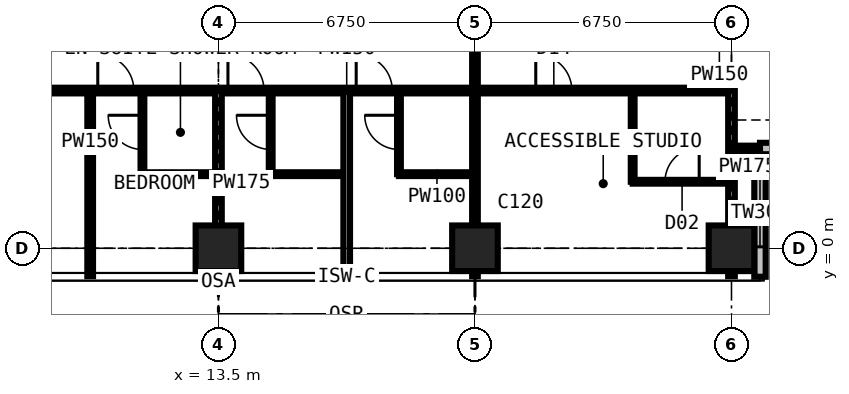
"""IFC4 building model, lengths in metres.
Left out: names, types, materials, properties, quantities, classifications, styles, units other than length and angle.
Written with IfcOpenShell. Run it as: python <this file> out.ifc"""

import sys

from ifc_helpers import new_model, si_unit, direction, frame, frame_2d, origin, origin_2d, place, context, subcontext, project, spatial, rectangle, extrude, element, fill, save


model = new_model("IFC4")
c1 = context("Model", 3, precision=1e-05, world=origin(), true_north=direction((0.0, 1.0)))
c2 = subcontext(c1, "Body", "Model", "MODEL_VIEW")
j1 = project(units=[si_unit("LENGTHUNIT", "METRE"), si_unit("PLANEANGLEUNIT", "RADIAN")], contexts=[c1])
p1 = place(None, origin())
s1 = spatial("IfcSite", under=j1, at=p1, CompositionType="ELEMENT")
p2 = place(p1, origin())
s2 = spatial("IfcBuilding", under=s1, at=p2, CompositionType="ELEMENT")
p3 = place(p2, frame((0.0, 0.0, 174.6)))
s3 = spatial("IfcBuildingStorey", under=s2, at=p3, CompositionType="ELEMENT", Elevation=174.6)
for number, where, z_axis, x_axis in (
    (1, (13.5, 0.0, 0.0), (0.0, 0.0, 1.0), (1.0, 0.0, 0.0)),
    (2, (20.25, 0.0, 0.0), (0.0, 0.0, 1.0), (1.0, 0.0, 0.0)),
    (3, (27.0, 0.0, 0.0), (0.0, 0.0, 1.0), (1.0, 0.0, 0.0)),
):
    element("IfcColumn", number, at=place(p3, frame(where, z_axis=z_axis, x_axis=x_axis)), inside=s3, PredefinedType="COLUMN", context=c2, shape_type="SweptSolid", body=[
        extrude(rectangle(XDim=1.2, YDim=1.2, at=origin_2d()), origin(), (0.0, 0.0, 1.0), 3.6),
    ])
p4 = place(p3, frame((27.75, -0.75, 0.0), z_axis=(0.0, 0.0, 1.0), x_axis=(0.0, 1.0, 0.0)))
e4 = element("IfcWall", 4, at=p4, inside=s3, PredefinedType="SOLIDWALL", context=c2, shape_type="SweptSolid", body=[
    extrude(rectangle(XDim=3.375, YDim=0.3, at=frame_2d((1.688, 0.0))), origin(), (0.0, 0.0, 1.0), 3.375),
])
p5 = place(p4, frame((0.788, 0.0, 0.6)))
e5 = element("IfcOpeningElement", 5, at=p5, cuts=e4, PredefinedType="OPENING", context=c2, shape_type="SweptSolid", body=[
    extrude(rectangle(XDim=1.8, YDim=2.1, at=frame_2d((0.9, 1.05))), frame((0.0, 0.16, 0.0), z_axis=(0.0, -1.0, 0.0), x_axis=(1.0, 0.0, 0.0)), (0.0, 0.0, 1.0), 0.32),
])
p6 = place(p3, frame((27.75, 2.625, 0.0), z_axis=(0.0, 0.0, 1.0), x_axis=(1.0, 0.0, 0.0)))
e6 = element("IfcWall", 6, at=p6, inside=s3, PredefinedType="SOLIDWALL", context=c2, shape_type="SweptSolid", body=[
    extrude(rectangle(XDim=3.375, YDim=0.3, at=frame_2d((1.688, 0.0))), origin(), (0.0, 0.0, 1.0), 3.375),
])
p7 = place(p6, frame((0.788, 0.0, 0.6)))
e7 = element("IfcOpeningElement", 7, at=p7, cuts=e6, PredefinedType="OPENING", context=c2, shape_type="SweptSolid", body=[
    extrude(rectangle(XDim=1.8, YDim=2.1, at=frame_2d((0.9, 1.05))), frame((0.0, 0.16, 0.0), z_axis=(0.0, -1.0, 0.0), x_axis=(1.0, 0.0, 0.0)), (0.0, 0.0, 1.0), 0.32),
])
p8 = place(p3, frame((6.75, 4.15, 0.0), z_axis=(0.0, 0.0, 1.0), x_axis=(1.0, 0.0, 0.0)))
e8 = element("IfcWall", 8, at=p8, inside=s3, PredefinedType="PARTITIONING", context=c2, shape_type="SweptSolid", body=[
    extrude(rectangle(XDim=20.25, YDim=0.15, at=frame_2d((10.125, 0.0))), origin(), (0.0, 0.0, 1.0), 3.375),
])
p9 = place(p8, frame((1.2, 0.0, 0.0)))
e9 = element("IfcOpeningElement", 9, at=p9, cuts=e8, PredefinedType="OPENING", context=c2, shape_type="SweptSolid", body=[
    extrude(rectangle(XDim=1.0, YDim=2.2, at=frame_2d((0.5, 1.1))), frame((0.0, 0.085, 0.0), z_axis=(0.0, -1.0, 0.0), x_axis=(1.0, 0.0, 0.0)), (0.0, 0.0, 1.0), 0.17),
])
p10 = place(p8, frame((3.575, 0.0, 0.0)))
e10 = element("IfcOpeningElement", 10, at=p10, cuts=e8, PredefinedType="OPENING", context=c2, shape_type="SweptSolid", body=[
    extrude(rectangle(XDim=0.95, YDim=2.2, at=frame_2d((0.475, 1.1))), frame((0.0, 0.085, 0.0), z_axis=(0.0, -1.0, 0.0), x_axis=(1.0, 0.0, 0.0)), (0.0, 0.0, 1.0), 0.17),
])
p11 = place(p8, frame((7.0, 0.0, 0.0)))
e11 = element("IfcOpeningElement", 11, at=p11, cuts=e8, PredefinedType="OPENING", context=c2, shape_type="SweptSolid", body=[
    extrude(rectangle(XDim=0.95, YDim=2.2, at=frame_2d((0.475, 1.1))), frame((0.0, 0.085, 0.0), z_axis=(0.0, -1.0, 0.0), x_axis=(1.0, 0.0, 0.0)), (0.0, 0.0, 1.0), 0.17),
])
p12 = place(p8, frame((10.375, 0.0, 0.0)))
e12 = element("IfcOpeningElement", 12, at=p12, cuts=e8, PredefinedType="OPENING", context=c2, shape_type="SweptSolid", body=[
    extrude(rectangle(XDim=0.95, YDim=2.2, at=frame_2d((0.475, 1.1))), frame((0.0, 0.085, 0.0), z_axis=(0.0, -1.0, 0.0), x_axis=(1.0, 0.0, 0.0)), (0.0, 0.0, 1.0), 0.17),
])
p13 = place(p8, frame((15.1, 0.0, 0.0)))
e13 = element("IfcOpeningElement", 13, at=p13, cuts=e8, PredefinedType="OPENING", context=c2, shape_type="SweptSolid", body=[
    extrude(rectangle(XDim=0.95, YDim=2.2, at=frame_2d((0.475, 1.1))), frame((0.0, 0.085, 0.0), z_axis=(0.0, -1.0, 0.0), x_axis=(1.0, 0.0, 0.0)), (0.0, 0.0, 1.0), 0.17),
])
p14 = place(p3, frame((10.125, -0.734, 0.0), z_axis=(0.0, 0.0, 1.0), x_axis=(0.0, 1.0, 0.0)))
e14 = element("IfcWall", 14, at=p14, inside=s3, PredefinedType="PARTITIONING", context=c2, shape_type="SweptSolid", body=[
    extrude(rectangle(XDim=4.884, YDim=0.15, at=frame_2d((2.442, 0.0))), origin(), (0.0, 0.0, 1.0), 3.375),
])
p15 = place(p3, frame((11.5, 1.95, 0.0), z_axis=(0.0, 0.0, 1.0), x_axis=(0.0, 1.0, 0.0)))
e15 = element("IfcWall", 15, at=p15, inside=s3, PredefinedType="PARTITIONING", context=c2, shape_type="SweptSolid", body=[
    extrude(rectangle(XDim=2.2, YDim=0.1, at=frame_2d((1.1, 0.0))), origin(), (0.0, 0.0, 1.0), 3.375),
])
p16 = place(p15, frame((0.65, 0.0, 0.0)))
e16 = element("IfcOpeningElement", 16, at=p16, cuts=e15, PredefinedType="OPENING", context=c2, shape_type="SweptSolid", body=[
    extrude(rectangle(XDim=0.9, YDim=2.2, at=frame_2d((0.45, 1.1))), frame((0.0, 0.06, 0.0), z_axis=(0.0, -1.0, 0.0), x_axis=(1.0, 0.0, 0.0)), (0.0, 0.0, 1.0), 0.12),
])
p17 = place(p3, frame((11.5, 1.95, 0.0), z_axis=(0.0, 0.0, 1.0), x_axis=(1.0, 0.0, 0.0)))
e17 = element("IfcWall", 17, at=p17, inside=s3, PredefinedType="PARTITIONING", context=c2, shape_type="SweptSolid", body=[
    extrude(rectangle(XDim=2.0, YDim=0.1, at=frame_2d((1.0, 0.0))), origin(), (0.0, 0.0, 1.0), 3.375),
])
p18 = place(p3, frame((13.5, -0.734, 0.0), z_axis=(0.0, 0.0, 1.0), x_axis=(0.0, 1.0, 0.0)))
e18 = element("IfcWall", 18, at=p18, inside=s3, PredefinedType="PARTITIONING", context=c2, shape_type="SweptSolid", body=[
    extrude(rectangle(XDim=4.884, YDim=0.175, at=frame_2d((2.442, 0.0))), origin(), (0.0, 0.0, 1.0), 2.61),
])
p19 = place(p3, frame((14.875, 1.95, 0.0), z_axis=(0.0, 0.0, 1.0), x_axis=(0.0, 1.0, 0.0)))
e19 = element("IfcWall", 19, at=p19, inside=s3, PredefinedType="PARTITIONING", context=c2, shape_type="SweptSolid", body=[
    extrude(rectangle(XDim=2.2, YDim=0.1, at=frame_2d((1.1, 0.0))), origin(), (0.0, 0.0, 1.0), 3.375),
])
p20 = place(p19, frame((0.65, 0.0, 0.0)))
e20 = element("IfcOpeningElement", 20, at=p20, cuts=e19, PredefinedType="OPENING", context=c2, shape_type="SweptSolid", body=[
    extrude(rectangle(XDim=0.9, YDim=2.2, at=frame_2d((0.45, 1.1))), frame((0.0, 0.06, 0.0), z_axis=(0.0, -1.0, 0.0), x_axis=(1.0, 0.0, 0.0)), (0.0, 0.0, 1.0), 0.12),
])
p21 = place(p3, frame((14.875, 1.95, 0.0), z_axis=(0.0, 0.0, 1.0), x_axis=(1.0, 0.0, 0.0)))
e21 = element("IfcWall", 21, at=p21, inside=s3, PredefinedType="PARTITIONING", context=c2, shape_type="SweptSolid", body=[
    extrude(rectangle(XDim=2.0, YDim=0.1, at=frame_2d((1.0, 0.0))), origin(), (0.0, 0.0, 1.0), 3.375),
])
p22 = place(p3, frame((16.875, -0.734, 0.0), z_axis=(0.0, 0.0, 1.0), x_axis=(0.0, 1.0, 0.0)))
e22 = element("IfcWall", 22, at=p22, inside=s3, PredefinedType="PARTITIONING", context=c2, shape_type="SweptSolid", body=[
    extrude(rectangle(XDim=4.884, YDim=0.175, at=frame_2d((2.442, 0.0))), origin(), (0.0, 0.0, 1.0), 3.375),
])
p23 = place(p3, frame((18.25, 1.95, 0.0), z_axis=(0.0, 0.0, 1.0), x_axis=(0.0, 1.0, 0.0)))
e23 = element("IfcWall", 23, at=p23, inside=s3, PredefinedType="PARTITIONING", context=c2, shape_type="SweptSolid", body=[
    extrude(rectangle(XDim=2.2, YDim=0.1, at=frame_2d((1.1, 0.0))), origin(), (0.0, 0.0, 1.0), 3.375),
])
p24 = place(p23, frame((0.65, 0.0, 0.0)))
e24 = element("IfcOpeningElement", 24, at=p24, cuts=e23, PredefinedType="OPENING", context=c2, shape_type="SweptSolid", body=[
    extrude(rectangle(XDim=0.9, YDim=2.2, at=frame_2d((0.45, 1.1))), frame((0.0, 0.06, 0.0), z_axis=(0.0, -1.0, 0.0), x_axis=(1.0, 0.0, 0.0)), (0.0, 0.0, 1.0), 0.12),
])
p25 = place(p3, frame((18.25, 1.95, 0.0), z_axis=(0.0, 0.0, 1.0), x_axis=(1.0, 0.0, 0.0)))
e25 = element("IfcWall", 25, at=p25, inside=s3, PredefinedType="PARTITIONING", context=c2, shape_type="SweptSolid", body=[
    extrude(rectangle(XDim=2.0, YDim=0.1, at=frame_2d((1.0, 0.0))), origin(), (0.0, 0.0, 1.0), 3.375),
])
p26 = place(p3, frame((20.25, -0.734, 0.0), z_axis=(0.0, 0.0, 1.0), x_axis=(0.0, 1.0, 0.0)))
e26 = element("IfcWall", 26, at=p26, inside=s3, PredefinedType="PARTITIONING", context=c2, shape_type="SweptSolid", body=[
    extrude(rectangle(XDim=12.034, YDim=0.15, at=frame_2d((6.017, 0.0))), origin(), (0.0, 0.0, 1.0), 2.61),
])
p27 = place(p3, frame((24.4, 1.75, 0.0), z_axis=(0.0, 0.0, 1.0), x_axis=(0.0, 1.0, 0.0)))
e27 = element("IfcWall", 27, at=p27, inside=s3, PredefinedType="PARTITIONING", context=c2, shape_type="SweptSolid", body=[
    extrude(rectangle(XDim=2.4, YDim=0.1, at=frame_2d((1.2, 0.0))), origin(), (0.0, 0.0, 1.0), 3.375),
])
p28 = place(p3, frame((24.4, 1.75, 0.0), z_axis=(0.0, 0.0, 1.0), x_axis=(1.0, 0.0, 0.0)))
e28 = element("IfcWall", 28, at=p28, inside=s3, PredefinedType="PARTITIONING", context=c2, shape_type="SweptSolid", body=[
    extrude(rectangle(XDim=2.6, YDim=0.1, at=frame_2d((1.3, 0.0))), origin(), (0.0, 0.0, 1.0), 3.375),
])
p29 = place(p28, frame((0.85, 0.0, 0.0)))
e29 = element("IfcOpeningElement", 29, at=p29, cuts=e28, PredefinedType="OPENING", context=c2, shape_type="SweptSolid", body=[
    extrude(rectangle(XDim=0.9, YDim=2.2, at=frame_2d((0.45, 1.1))), frame((0.0, 0.06, 0.0), z_axis=(0.0, -1.0, 0.0), x_axis=(1.0, 0.0, 0.0)), (0.0, 0.0, 1.0), 0.12),
])
p30 = place(p3, frame((27.0, -0.734, 0.0), z_axis=(0.0, 0.0, 1.0), x_axis=(0.0, 1.0, 0.0)))
e30 = element("IfcWall", 30, at=p30, inside=s3, PredefinedType="PARTITIONING", context=c2, shape_type="SweptSolid", body=[
    extrude(rectangle(XDim=4.884, YDim=0.175, at=frame_2d((2.442, 0.0))), origin(), (0.0, 0.0, 1.0), 2.877),
])
p31 = place(p3, frame((27.0, 2.625, 0.0), z_axis=(0.0, 0.0, 1.0), x_axis=(1.0, 0.0, 0.0)))
e31 = element("IfcWall", 31, at=p31, inside=s3, PredefinedType="PARTITIONING", context=c2, shape_type="SweptSolid", body=[
    extrude(rectangle(XDim=0.734, YDim=0.15, at=frame_2d((0.367, 0.0))), origin(), (0.0, 0.0, 1.0), 3.375),
])
p32 = place(p5, origin())
e32 = element("IfcWindow", 32, at=p32, inside=s3, PartitioningType="SINGLE_PANEL", PredefinedType="WINDOW", context=c2, shape_type="SweptSolid", body=[
    extrude(rectangle(XDim=1.8, YDim=2.1, at=frame_2d((0.9, 1.05))), frame((0.0, 0.03, 0.0), z_axis=(0.0, -1.0, 0.0), x_axis=(1.0, 0.0, 0.0)), (0.0, 0.0, 1.0), 0.06),
])
fill(e5, e32)
p33 = place(p10, origin())
e33 = element("IfcDoor", 33, at=p33, inside=s3, OperationType="SINGLE_SWING_LEFT", PredefinedType="DOOR", context=c2, shape_type="SweptSolid", body=[
    extrude(rectangle(XDim=0.95, YDim=2.2, at=frame_2d((0.475, 1.1))), frame((0.0, 0.025, 0.0), z_axis=(0.0, -1.0, 0.0), x_axis=(1.0, 0.0, 0.0)), (0.0, 0.0, 1.0), 0.05),
])
fill(e10, e33)
p34 = place(p16, origin())
e34 = element("IfcDoor", 34, at=p34, inside=s3, OperationType="SINGLE_SWING_RIGHT", PredefinedType="DOOR", context=c2, shape_type="SweptSolid", body=[
    extrude(rectangle(XDim=0.9, YDim=2.2, at=frame_2d((0.45, 1.1))), frame((0.0, 0.025, 0.0), z_axis=(0.0, -1.0, 0.0), x_axis=(1.0, 0.0, 0.0)), (0.0, 0.0, 1.0), 0.05),
])
fill(e16, e34)
p35 = place(p11, origin())
e35 = element("IfcDoor", 35, at=p35, inside=s3, OperationType="SINGLE_SWING_LEFT", PredefinedType="DOOR", context=c2, shape_type="SweptSolid", body=[
    extrude(rectangle(XDim=0.95, YDim=2.2, at=frame_2d((0.475, 1.1))), frame((0.0, 0.025, 0.0), z_axis=(0.0, -1.0, 0.0), x_axis=(1.0, 0.0, 0.0)), (0.0, 0.0, 1.0), 0.05),
])
fill(e11, e35)
p36 = place(p20, origin())
e36 = element("IfcDoor", 36, at=p36, inside=s3, OperationType="SINGLE_SWING_RIGHT", PredefinedType="DOOR", context=c2, shape_type="SweptSolid", body=[
    extrude(rectangle(XDim=0.9, YDim=2.2, at=frame_2d((0.45, 1.1))), frame((0.0, 0.025, 0.0), z_axis=(0.0, -1.0, 0.0), x_axis=(1.0, 0.0, 0.0)), (0.0, 0.0, 1.0), 0.05),
])
fill(e20, e36)
p37 = place(p12, origin())
e37 = element("IfcDoor", 37, at=p37, inside=s3, OperationType="SINGLE_SWING_LEFT", PredefinedType="DOOR", context=c2, shape_type="SweptSolid", body=[
    extrude(rectangle(XDim=0.95, YDim=2.2, at=frame_2d((0.475, 1.1))), frame((0.0, 0.025, 0.0), z_axis=(0.0, -1.0, 0.0), x_axis=(1.0, 0.0, 0.0)), (0.0, 0.0, 1.0), 0.05),
])
fill(e12, e37)
p38 = place(p24, origin())
e38 = element("IfcDoor", 38, at=p38, inside=s3, OperationType="SINGLE_SWING_RIGHT", PredefinedType="DOOR", context=c2, shape_type="SweptSolid", body=[
    extrude(rectangle(XDim=0.9, YDim=2.2, at=frame_2d((0.45, 1.1))), frame((0.0, 0.025, 0.0), z_axis=(0.0, -1.0, 0.0), x_axis=(1.0, 0.0, 0.0)), (0.0, 0.0, 1.0), 0.05),
])
fill(e24, e38)
p39 = place(p13, origin())
e39 = element("IfcDoor", 39, at=p39, inside=s3, OperationType="SINGLE_SWING_LEFT", PredefinedType="DOOR", context=c2, shape_type="SweptSolid", body=[
    extrude(rectangle(XDim=0.95, YDim=2.2, at=frame_2d((0.475, 1.1))), frame((0.0, 0.025, 0.0), z_axis=(0.0, -1.0, 0.0), x_axis=(1.0, 0.0, 0.0)), (0.0, 0.0, 1.0), 0.05),
])
fill(e13, e39)
p40 = place(p29, origin())
e40 = element("IfcDoor", 40, at=p40, inside=s3, OperationType="SINGLE_SWING_RIGHT", PredefinedType="DOOR", context=c2, shape_type="SweptSolid", body=[
    extrude(rectangle(XDim=0.9, YDim=2.2, at=frame_2d((0.45, 1.1))), frame((0.0, 0.025, 0.0), z_axis=(0.0, -1.0, 0.0), x_axis=(1.0, 0.0, 0.0)), (0.0, 0.0, 1.0), 0.05),
])
fill(e29, e40)
save(model, sys.argv[1])
